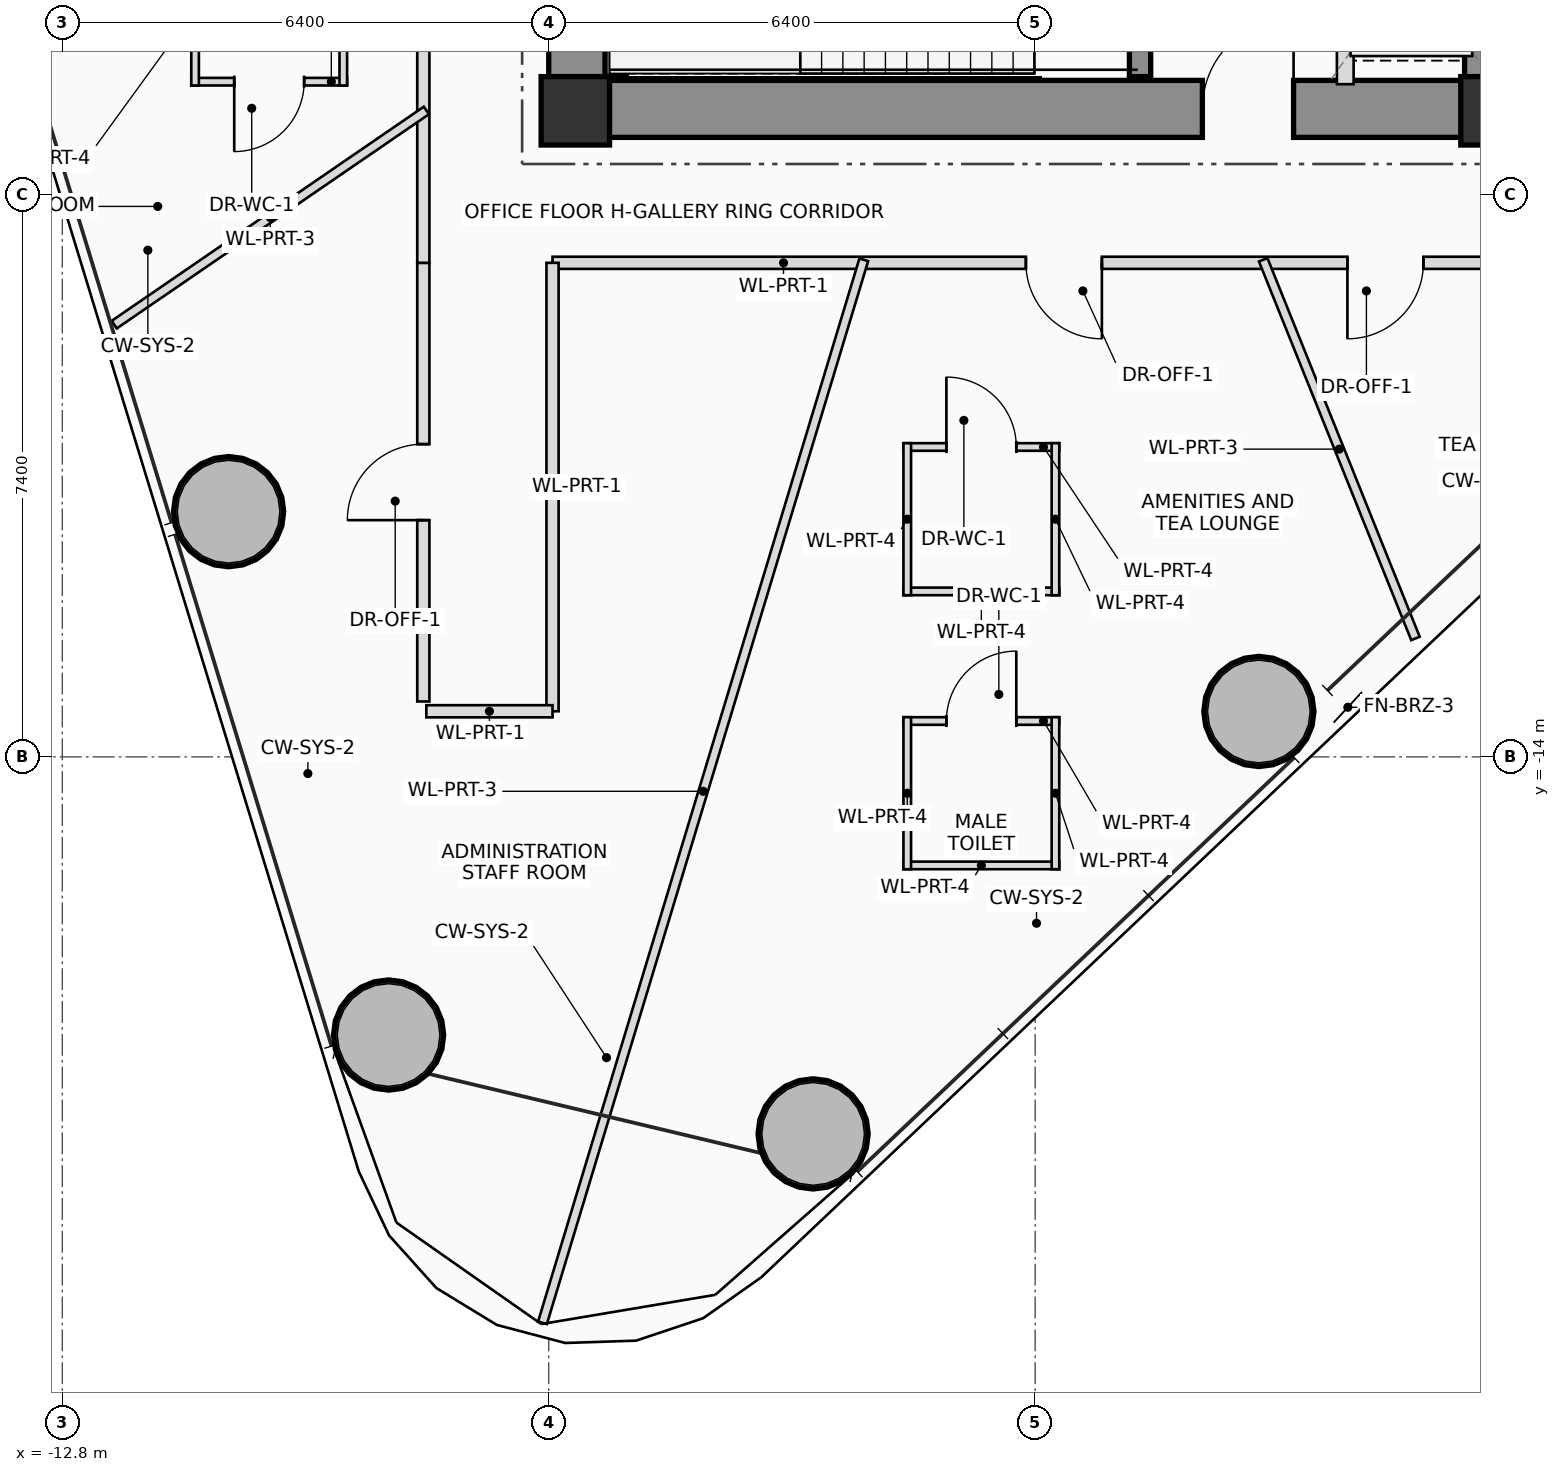
"""IFC4 building model, lengths in metres.
Left out: names, types, materials, properties, quantities, classifications, styles, units other than length and angle.
Written with IfcOpenShell. Run it as: python <this file> out.ifc"""

import sys

from ifc_helpers import new_model, si_unit, direction, frame, frame_2d, origin, origin_2d, place, context, subcontext, project, spatial, rectangle, hollow_circle, extrude, source, transform, mapped, element, fill, save


model = new_model("IFC4")
c1 = context("Model", 3, precision=1e-05, world=origin(), true_north=direction((0.0, 1.0)))
c2 = subcontext(c1, "Body", "Model", "MODEL_VIEW")
j1 = project(units=[si_unit("LENGTHUNIT", "METRE"), si_unit("PLANEANGLEUNIT", "RADIAN")], contexts=[c1])
p1 = place(None, origin())
s1 = spatial("IfcSite", under=j1, at=p1, CompositionType="ELEMENT")
p2 = place(p1, origin())
s2 = spatial("IfcBuilding", under=s1, at=p2, CompositionType="ELEMENT")
p3 = place(p2, frame((0.0, 0.0, 93.65)))
s3 = spatial("IfcBuildingStorey", under=s2, at=p3, CompositionType="ELEMENT", Elevation=93.65)
m1 = source(origin(), c2, "Body", "SweptSolid", [
    extrude(rectangle(XDim=0.9, YDim=0.9, at=origin_2d()), origin(), (0.0, 0.0, 1.0), 3.75),
])
for number, where, z_axis, x_axis in (
    (1, (-6.05, -5.5, 0.0), (0.0, 0.0, 1.0), (1.0, 0.0, 0.0)),
    (2, (6.05, -5.5, 0.0), (0.0, 0.0, 1.0), (1.0, 0.0, 0.0)),
):
    element("IfcColumn", number, at=place(p3, frame(where, z_axis=z_axis, x_axis=x_axis)), inside=s3, PredefinedType="COLUMN", context=c2, shape_type="MappedRepresentation", body=[
        mapped(m1, transform((0.0, 0.0, 0.0), scale=1.0)),
    ])
p4 = place(p3, frame((-6.4, -5.475, 0.0), z_axis=(0.0, 0.0, 1.0), x_axis=(1.0, 0.0, 0.0)))
e3 = element("IfcWall", 3, at=p4, inside=s3, PredefinedType="SHEAR", context=c2, shape_type="SweptSolid", body=[
    extrude(rectangle(XDim=12.8, YDim=0.75, at=frame_2d((6.4, 0.0))), origin(), (0.0, 0.0, 1.0), 3.75),
])
p5 = place(p4, frame((8.6, 0.0, 0.0)))
e4 = element("IfcOpeningElement", 4, at=p5, cuts=e3, PredefinedType="OPENING", context=c2, shape_type="SweptSolid", body=[
    extrude(rectangle(XDim=1.2, YDim=2.2, at=frame_2d((0.6, 1.1))), frame((0.0, 0.385, 0.0), z_axis=(0.0, -1.0, 0.0), x_axis=(1.0, 0.0, 0.0)), (0.0, 0.0, 1.0), 0.77),
])
p6 = place(p3, frame((6.025, -5.1, 0.0), z_axis=(0.0, 0.0, 1.0), x_axis=(0.0, 1.0, 0.0)))
e5 = element("IfcWall", 5, at=p6, inside=s3, PredefinedType="SHEAR", context=c2, shape_type="SweptSolid", body=[
    extrude(rectangle(XDim=10.2, YDim=0.75, at=frame_2d((5.1, 0.0))), origin(), (0.0, 0.0, 1.0), 3.75),
])
p7 = place(p3, frame((-6.025, -5.1, 0.0), z_axis=(0.0, 0.0, 1.0), x_axis=(0.0, 1.0, 0.0)))
e6 = element("IfcWall", 6, at=p7, inside=s3, PredefinedType="SHEAR", context=c2, shape_type="SweptSolid", body=[
    extrude(rectangle(XDim=3.35, YDim=0.75, at=frame_2d((1.675, 0.0))), origin(), (0.0, 0.0, 1.0), 3.75),
])
p8 = place(p3, frame((-5.52, -5.05, 0.0), z_axis=(0.0, 0.0, 1.0), x_axis=(0.0, 1.0, 0.0)))
e7 = element("IfcWall", 7, at=p8, inside=s3, PredefinedType="SHEAR", context=c2, shape_type="SweptSolid", body=[
    extrude(rectangle(XDim=2.75, YDim=0.28, at=frame_2d((1.375, 0.0))), origin(), (0.0, 0.0, 1.0), 3.75),
])
p9 = place(p3, frame((1.38, -5.05, 0.0), z_axis=(0.0, 0.0, 1.0), x_axis=(0.0, 1.0, 0.0)))
e8 = element("IfcWall", 8, at=p9, inside=s3, PredefinedType="SHEAR", context=c2, shape_type="SweptSolid", body=[
    extrude(rectangle(XDim=0.8, YDim=0.28, at=frame_2d((0.4, 0.0))), origin(), (0.0, 0.0, 1.0), 3.75),
])
m2 = source(origin(), c2, "Body", "SweptSolid", [
    extrude(hollow_circle(Radius=0.725, WallThickness=0.05, at=origin_2d()), origin(), (0.0, 0.0, 1.0), 3.75),
])
for number, where, z_axis, x_axis in (
    (9, (-2.921, -18.96, 0.0), (0.0, 0.0, 1.0), (1.0, 0.0, 0.0)),
    (10, (2.943, -13.402, 0.0), (0.0, 0.0, 1.0), (1.0, 0.0, 0.0)),
    (11, (-10.612, -10.774, 0.0), (0.0, 0.0, 1.0), (1.0, 0.0, 0.0)),
    (12, (-8.507, -17.659, 0.0), (0.0, 0.0, 1.0), (1.0, 0.0, 0.0)),
):
    element("IfcColumn", number, at=place(p3, frame(where, z_axis=z_axis, x_axis=x_axis)), inside=s3, PredefinedType="COLUMN", context=c2, shape_type="MappedRepresentation", body=[
        mapped(m2, transform((0.0, 0.0, 0.0), scale=1.0)),
    ])
p10 = place(p3, frame((4.08, -5.15, 0.0), z_axis=(0.0, 0.0, 1.0), x_axis=(0.0, 1.0, 0.0)))
e13 = element("IfcWall", 13, at=p10, inside=s3, PredefinedType="PLUMBINGWALL", context=c2, shape_type="SweptSolid", body=[
    extrude(rectangle(XDim=2.95, YDim=0.22, at=frame_2d((1.475, 0.0))), origin(), (0.0, 0.0, 1.0), 3.545),
])
p11 = place(p10, frame((0.95, 0.0, 0.0)))
e14 = element("IfcOpeningElement", 14, at=p11, cuts=e13, PredefinedType="OPENING", context=c2, shape_type="SweptSolid", body=[
    extrude(rectangle(XDim=1.2, YDim=2.25, at=frame_2d((0.6, 1.125))), frame((0.0, 0.12, 0.0), z_axis=(0.0, -1.0, 0.0), x_axis=(1.0, 0.0, 0.0)), (0.0, 0.0, 1.0), 0.24),
])
p12 = place(p3, frame((-1.733, -13.528, 0.0), z_axis=(0.0, 0.0, 1.0), x_axis=(1.0, 0.0, 0.0)))
e15 = element("IfcWall", 15, at=p12, inside=s3, PredefinedType="PARTITIONING", context=c2, shape_type="SweptSolid", body=[
    extrude(rectangle(XDim=2.05, YDim=0.1, at=frame_2d((1.025, 0.0))), origin(), (0.0, 0.0, 1.0), 3.2),
])
p13 = place(p12, frame((0.565, 0.0, 0.0)))
e16 = element("IfcOpeningElement", 16, at=p13, cuts=e15, PredefinedType="OPENING", context=c2, shape_type="SweptSolid", body=[
    extrude(rectangle(XDim=0.92, YDim=2.1, at=frame_2d((0.46, 1.05))), frame((0.0, 0.06, 0.0), z_axis=(0.0, -1.0, 0.0), x_axis=(1.0, 0.0, 0.0)), (0.0, 0.0, 1.0), 0.12),
])
p14 = place(p3, frame((0.317, -15.428, 0.0), z_axis=(0.0, 0.0, 1.0), x_axis=(-1.0, 0.0, 0.0)))
e17 = element("IfcWall", 17, at=p14, inside=s3, PredefinedType="PARTITIONING", context=c2, shape_type="SweptSolid", body=[
    extrude(rectangle(XDim=2.05, YDim=0.1, at=frame_2d((1.025, 0.0))), origin(), (0.0, 0.0, 1.0), 3.545),
])
p15 = place(p3, frame((0.267, -13.478, 0.0), z_axis=(0.0, 0.0, 1.0), x_axis=(0.0, -1.0, 0.0)))
e18 = element("IfcWall", 18, at=p15, inside=s3, PredefinedType="PARTITIONING", context=c2, shape_type="SweptSolid", body=[
    extrude(rectangle(XDim=2.0, YDim=0.1, at=frame_2d((1.0, 0.0))), origin(), (0.0, 0.0, 1.0), 3.545),
])
p16 = place(p3, frame((-1.683, -15.478, 0.0), z_axis=(0.0, 0.0, 1.0), x_axis=(0.0, 1.0, 0.0)))
e19 = element("IfcWall", 19, at=p16, inside=s3, PredefinedType="PARTITIONING", context=c2, shape_type="SweptSolid", body=[
    extrude(rectangle(XDim=2.0, YDim=0.1, at=frame_2d((1.0, 0.0))), origin(), (0.0, 0.0, 1.0), 3.2),
])
p17 = place(p3, frame((-1.733, -9.923, 0.0), z_axis=(0.0, 0.0, 1.0), x_axis=(1.0, 0.0, 0.0)))
e20 = element("IfcWall", 20, at=p17, inside=s3, PredefinedType="PARTITIONING", context=c2, shape_type="SweptSolid", body=[
    extrude(rectangle(XDim=2.05, YDim=0.1, at=frame_2d((1.025, 0.0))), origin(), (0.0, 0.0, 1.0), 3.545),
])
p18 = place(p17, frame((0.565, 0.0, 0.0)))
e21 = element("IfcOpeningElement", 21, at=p18, cuts=e20, PredefinedType="OPENING", context=c2, shape_type="SweptSolid", body=[
    extrude(rectangle(XDim=0.92, YDim=2.1, at=frame_2d((0.46, 1.05))), frame((0.0, 0.06, 0.0), z_axis=(0.0, -1.0, 0.0), x_axis=(1.0, 0.0, 0.0)), (0.0, 0.0, 1.0), 0.12),
])
p19 = place(p3, frame((0.317, -11.823, 0.0), z_axis=(0.0, 0.0, 1.0), x_axis=(-1.0, 0.0, 0.0)))
e22 = element("IfcWall", 22, at=p19, inside=s3, PredefinedType="PARTITIONING", context=c2, shape_type="SweptSolid", body=[
    extrude(rectangle(XDim=2.05, YDim=0.1, at=frame_2d((1.025, 0.0))), origin(), (0.0, 0.0, 1.0), 3.05),
])
for number, where, z_axis, x_axis in (
    (23, (0.267, -9.873, 0.0), (0.0, 0.0, 1.0), (0.0, -1.0, 0.0)),
    (24, (-1.683, -11.873, 0.0), (0.0, 0.0, 1.0), (0.0, 1.0, 0.0)),
):
    element("IfcWall", number, at=place(p3, frame(where, z_axis=z_axis, x_axis=x_axis)), inside=s3, PredefinedType="PARTITIONING", context=c2, shape_type="SweptSolid", body=[
        extrude(rectangle(XDim=2.0, YDim=0.1, at=frame_2d((1.0, 0.0))), origin(), (0.0, 0.0, 1.0), 3.05),
    ])
p20 = place(p3, frame((-9.053, -5.117, 0.0), z_axis=(0.0, 0.0, 1.0), x_axis=(-1.0, 0.0, 0.0)))
e25 = element("IfcWall", 25, at=p20, inside=s3, PredefinedType="PARTITIONING", context=c2, shape_type="SweptSolid", body=[
    extrude(rectangle(XDim=2.05, YDim=0.1, at=frame_2d((1.025, 0.0))), origin(), (0.0, 0.0, 1.0), 3.05),
])
p21 = place(p20, frame((0.565, 0.0, 0.0)))
e26 = element("IfcOpeningElement", 26, at=p21, cuts=e25, PredefinedType="OPENING", context=c2, shape_type="SweptSolid", body=[
    extrude(rectangle(XDim=0.92, YDim=2.1, at=frame_2d((0.46, 1.05))), frame((0.0, 0.06, 0.0), z_axis=(0.0, -1.0, 0.0), x_axis=(1.0, 0.0, 0.0)), (0.0, 0.0, 1.0), 0.12),
])
for number, where, z_axis, x_axis in (
    (27, (-9.103, -3.167, 0.0), (0.0, 0.0, 1.0), (0.0, -1.0, 0.0)),
    (28, (-11.053, -5.167, 0.0), (0.0, 0.0, 1.0), (0.0, 1.0, 0.0)),
):
    element("IfcWall", number, at=place(p3, frame(where, z_axis=z_axis, x_axis=x_axis)), inside=s3, PredefinedType="PARTITIONING", context=c2, shape_type="SweptSolid", body=[
        extrude(rectangle(XDim=2.0, YDim=0.1, at=frame_2d((1.0, 0.0))), origin(), (0.0, 0.0, 1.0), 2.85),
    ])
p22 = place(p3, frame((-8.05, -13.271, 0.0), z_axis=(0.0, 0.0, 1.0), x_axis=(0.0, 1.0, 0.0)))
e29 = element("IfcWall", 29, at=p22, inside=s3, PredefinedType="PARTITIONING", context=c2, shape_type="SweptSolid", body=[
    extrude(rectangle(XDim=5.771, YDim=0.16, at=frame_2d((2.885, 0.0))), origin(), (0.0, 0.0, 1.0), 2.85),
])
p23 = place(p22, frame((2.385, 0.0, 0.0)))
e30 = element("IfcOpeningElement", 30, at=p23, cuts=e29, PredefinedType="OPENING", context=c2, shape_type="SweptSolid", body=[
    extrude(rectangle(XDim=1.0, YDim=2.25, at=frame_2d((0.5, 1.125))), frame((0.0, 0.09, 0.0), z_axis=(0.0, -1.0, 0.0), x_axis=(1.0, 0.0, 0.0)), (0.0, 0.0, 1.0), 0.18),
])
p24 = place(p3, frame((-8.05, -7.5, 0.0), z_axis=(0.0, 0.0, 1.0), x_axis=(0.0, 1.0, 0.0)))
e31 = element("IfcWall", 31, at=p24, inside=s3, PredefinedType="PARTITIONING", context=c2, shape_type="SweptSolid", body=[
    extrude(rectangle(XDim=15.0, YDim=0.16, at=frame_2d((7.5, 0.0))), origin(), (0.0, 0.0, 1.0), 2.85),
])
p25 = place(p24, frame((3.292, 0.0, 0.0)))
e32 = element("IfcOpeningElement", 32, at=p25, cuts=e31, PredefinedType="OPENING", context=c2, shape_type="SweptSolid", body=[
    extrude(rectangle(XDim=1.0, YDim=2.25, at=frame_2d((0.5, 1.125))), frame((0.0, 0.09, 0.0), z_axis=(0.0, -1.0, 0.0), x_axis=(1.0, 0.0, 0.0)), (0.0, 0.0, 1.0), 0.18),
])
p26 = place(p24, frame((8.524, 0.0, 0.0)))
e33 = element("IfcOpeningElement", 33, at=p26, cuts=e31, PredefinedType="OPENING", context=c2, shape_type="SweptSolid", body=[
    extrude(rectangle(XDim=1.0, YDim=2.25, at=frame_2d((0.5, 1.125))), frame((0.0, 0.09, 0.0), z_axis=(0.0, -1.0, 0.0), x_axis=(1.0, 0.0, 0.0)), (0.0, 0.0, 1.0), 0.18),
])
p27 = place(p24, frame((13.105, 0.0, 0.0)))
e34 = element("IfcOpeningElement", 34, at=p27, cuts=e31, PredefinedType="OPENING", context=c2, shape_type="SweptSolid", body=[
    extrude(rectangle(XDim=1.0, YDim=2.25, at=frame_2d((0.5, 1.125))), frame((0.0, 0.09, 0.0), z_axis=(0.0, -1.0, 0.0), x_axis=(1.0, 0.0, 0.0)), (0.0, 0.0, 1.0), 0.18),
])
p28 = place(p3, frame((6.35, -7.5, 0.0), z_axis=(0.0, 0.0, 1.0), x_axis=(-1.0, 0.0, 0.0)))
e35 = element("IfcWall", 35, at=p28, inside=s3, PredefinedType="PARTITIONING", context=c2, shape_type="SweptSolid", body=[
    extrude(rectangle(XDim=12.7, YDim=0.16, at=frame_2d((6.35, 0.0))), origin(), (0.0, 0.0, 1.0), 2.85),
])
p29 = place(p28, frame((1.242, 0.0, 0.0)))
e36 = element("IfcOpeningElement", 36, at=p29, cuts=e35, PredefinedType="OPENING", context=c2, shape_type="SweptSolid", body=[
    extrude(rectangle(XDim=1.0, YDim=2.25, at=frame_2d((0.5, 1.125))), frame((0.0, 0.09, 0.0), z_axis=(0.0, -1.0, 0.0), x_axis=(1.0, 0.0, 0.0)), (0.0, 0.0, 1.0), 0.18),
])
p30 = place(p28, frame((5.472, 0.0, 0.0)))
e37 = element("IfcOpeningElement", 37, at=p30, cuts=e35, PredefinedType="OPENING", context=c2, shape_type="SweptSolid", body=[
    extrude(rectangle(XDim=1.0, YDim=2.25, at=frame_2d((0.5, 1.125))), frame((0.0, 0.09, 0.0), z_axis=(0.0, -1.0, 0.0), x_axis=(1.0, 0.0, 0.0)), (0.0, 0.0, 1.0), 0.18),
])
p31 = place(p3, frame((-6.35, -7.5, 0.0), z_axis=(0.0, 0.0, 1.0), x_axis=(0.0, -1.0, 0.0)))
e38 = element("IfcWall", 38, at=p31, inside=s3, PredefinedType="PARTITIONING", context=c2, shape_type="SweptSolid", body=[
    extrude(rectangle(XDim=5.9, YDim=0.16, at=frame_2d((2.95, 0.0))), origin(), (0.0, 0.0, 1.0), 2.85),
])
p32 = place(p3, frame((-6.35, -13.4, 0.0), z_axis=(0.0, 0.0, 1.0), x_axis=(-1.0, 0.0, 0.0)))
e39 = element("IfcWall", 39, at=p32, inside=s3, PredefinedType="PARTITIONING", context=c2, shape_type="SweptSolid", body=[
    extrude(rectangle(XDim=1.66, YDim=0.16, at=frame_2d((0.83, 0.0))), origin(), (0.0, 0.0, 1.0), 2.85),
])
p33 = place(p3, frame((-8.01, -5.496, 0.0), z_axis=(0.0, 0.0, 1.0), x_axis=(-0.824586433319, -0.565735993186, 0.0)))
e40 = element("IfcWall", 40, at=p33, inside=s3, PredefinedType="PARTITIONING", context=c2, shape_type="SweptSolid", body=[
    extrude(rectangle(XDim=4.981, YDim=0.12, at=frame_2d((2.49, 0.0))), origin(), (0.0, 0.0, 1.0), 3.01),
])
p34 = place(p3, frame((-2.255, -7.46, 0.0), z_axis=(0.0, 0.0, 1.0), x_axis=(-0.289332531311, -0.957228648926, 0.0)))
e41 = element("IfcWall", 41, at=p34, inside=s3, PredefinedType="PARTITIONING", context=c2, shape_type="SweptSolid", body=[
    extrude(rectangle(XDim=14.611, YDim=0.12, at=frame_2d((7.305, 0.0))), origin(), (0.0, 0.0, 1.0), 2.85),
])
p35 = place(p3, frame((3.0, -7.46, 0.0), z_axis=(0.0, 0.0, 1.0), x_axis=(0.37313810105, -0.927775812115, 0.0)))
e42 = element("IfcWall", 42, at=p35, inside=s3, PredefinedType="PARTITIONING", context=c2, shape_type="SweptSolid", body=[
    extrude(rectangle(XDim=5.37, YDim=0.12, at=frame_2d((2.685, 0.0))), origin(), (0.0, 0.0, 1.0), 2.85),
])
p36 = place(p5, origin())
e43 = element("IfcDoor", 43, at=p36, inside=s3, OperationType="SINGLE_SWING_RIGHT", PredefinedType="DOOR", context=c2, shape_type="SweptSolid", body=[
    extrude(rectangle(XDim=1.2, YDim=2.2, at=frame_2d((0.6, 1.1))), frame((0.0, 0.025, 0.0), z_axis=(0.0, -1.0, 0.0), x_axis=(1.0, 0.0, 0.0)), (0.0, 0.0, 1.0), 0.05),
])
fill(e4, e43)
p37 = place(p13, origin())
e44 = element("IfcDoor", 44, at=p37, inside=s3, OperationType="SINGLE_SWING_RIGHT", PredefinedType="DOOR", context=c2, shape_type="SweptSolid", body=[
    extrude(rectangle(XDim=0.92, YDim=2.1, at=frame_2d((0.46, 1.05))), frame((0.0, 0.025, 0.0), z_axis=(0.0, -1.0, 0.0), x_axis=(1.0, 0.0, 0.0)), (0.0, 0.0, 1.0), 0.05),
])
fill(e16, e44)
p38 = place(p18, origin())
e45 = element("IfcDoor", 45, at=p38, inside=s3, OperationType="SINGLE_SWING_LEFT", PredefinedType="DOOR", context=c2, shape_type="SweptSolid", body=[
    extrude(rectangle(XDim=0.92, YDim=2.1, at=frame_2d((0.46, 1.05))), frame((0.0, 0.025, 0.0), z_axis=(0.0, -1.0, 0.0), x_axis=(1.0, 0.0, 0.0)), (0.0, 0.0, 1.0), 0.05),
])
fill(e21, e45)
p39 = place(p21, origin())
e46 = element("IfcDoor", 46, at=p39, inside=s3, OperationType="SINGLE_SWING_RIGHT", PredefinedType="DOOR", context=c2, shape_type="SweptSolid", body=[
    extrude(rectangle(XDim=0.92, YDim=2.1, at=frame_2d((0.46, 1.05))), frame((0.0, 0.025, 0.0), z_axis=(0.0, -1.0, 0.0), x_axis=(1.0, 0.0, 0.0)), (0.0, 0.0, 1.0), 0.05),
])
fill(e26, e46)
p40 = place(p23, origin())
e47 = element("IfcDoor", 47, at=p40, inside=s3, OperationType="SINGLE_SWING_LEFT", PredefinedType="DOOR", context=c2, shape_type="SweptSolid", body=[
    extrude(rectangle(XDim=1.0, YDim=2.25, at=frame_2d((0.5, 1.125))), frame((0.0, 0.025, 0.0), z_axis=(0.0, -1.0, 0.0), x_axis=(1.0, 0.0, 0.0)), (0.0, 0.0, 1.0), 0.05),
])
fill(e30, e47)
p41 = place(p29, origin())
e48 = element("IfcDoor", 48, at=p41, inside=s3, OperationType="SINGLE_SWING_RIGHT", PredefinedType="DOOR", context=c2, shape_type="SweptSolid", body=[
    extrude(rectangle(XDim=1.0, YDim=2.25, at=frame_2d((0.5, 1.125))), frame((0.0, 0.025, 0.0), z_axis=(0.0, -1.0, 0.0), x_axis=(1.0, 0.0, 0.0)), (0.0, 0.0, 1.0), 0.05),
])
fill(e36, e48)
p42 = place(p30, origin())
e49 = element("IfcDoor", 49, at=p42, inside=s3, OperationType="SINGLE_SWING_LEFT", PredefinedType="DOOR", context=c2, shape_type="SweptSolid", body=[
    extrude(rectangle(XDim=1.0, YDim=2.25, at=frame_2d((0.5, 1.125))), frame((0.0, 0.025, 0.0), z_axis=(0.0, -1.0, 0.0), x_axis=(1.0, 0.0, 0.0)), (0.0, 0.0, 1.0), 0.05),
])
fill(e37, e49)
save(model, sys.argv[1])
